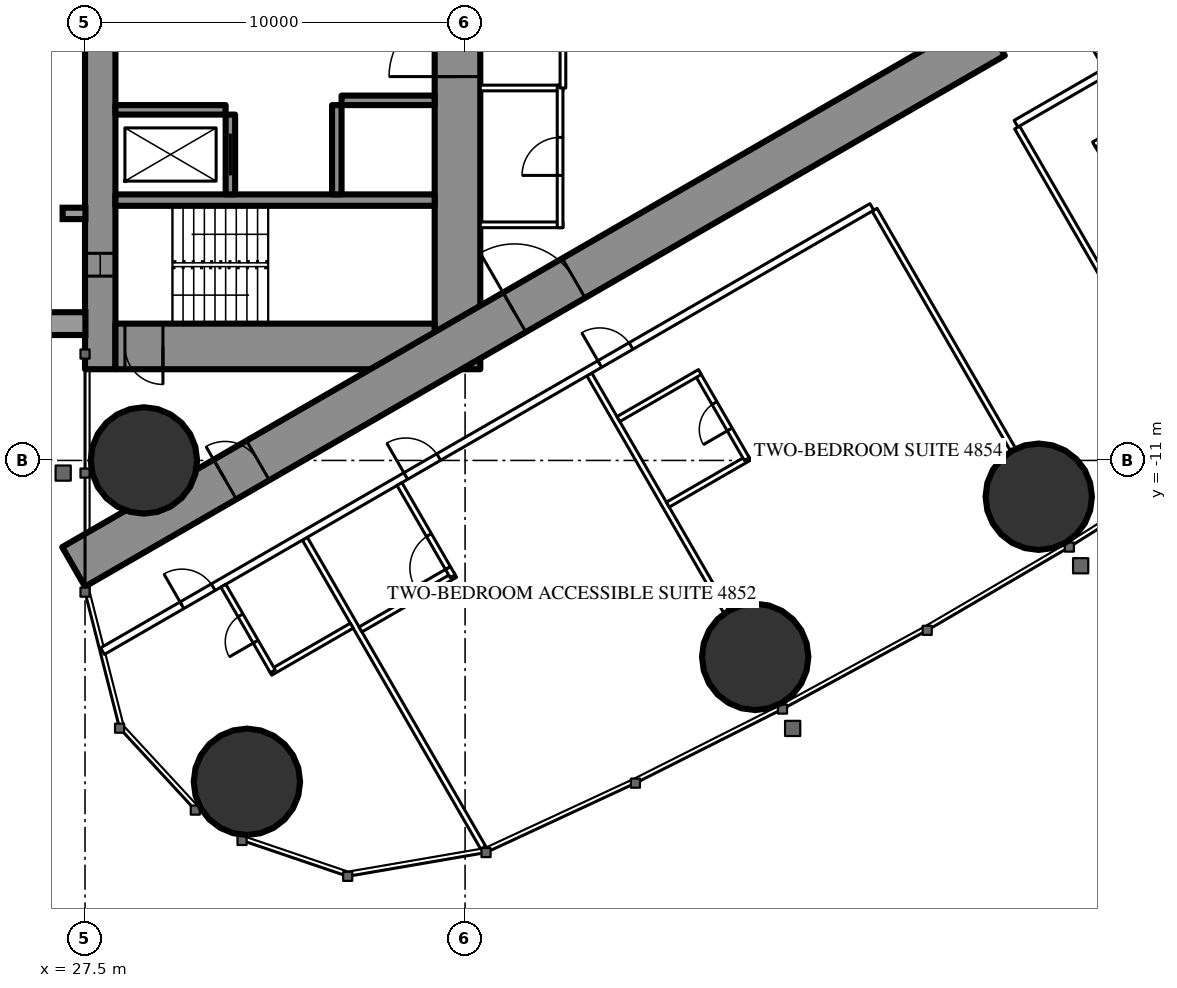
"""IFC4 building model, lengths in metres.
Left out: names, types, materials, properties, quantities, classifications, styles, units other than length and angle.
Written with IfcOpenShell. Run it as: python <this file> out.ifc"""

import sys

from ifc_helpers import new_model, si_unit, direction, frame, frame_2d, origin, origin_2d, place, context, subcontext, project, spatial, rectangle, circle, extrude, element, fill, save


model = new_model("IFC4")
c1 = context("Model", 3, precision=1e-05, world=origin(), true_north=direction((0.0, 1.0)))
c2 = subcontext(c1, "Body", "Model", "MODEL_VIEW")
j1 = project(units=[si_unit("LENGTHUNIT", "METRE"), si_unit("PLANEANGLEUNIT", "RADIAN")], contexts=[c1])
p1 = place(None, origin())
s1 = spatial("IfcSite", under=j1, at=p1, CompositionType="ELEMENT")
p2 = place(p1, origin())
s2 = spatial("IfcBuilding", under=s1, at=p2, CompositionType="ELEMENT")
p3 = place(p2, frame((0.0, 0.0, 180.8)))
s3 = spatial("IfcBuildingStorey", under=s2, at=p3, CompositionType="ELEMENT", Elevation=180.8)
for number, where, z_axis, x_axis in (
    (1, (31.76, -19.456, 0.0), (0.0, 0.0, 1.0), (1.0, 0.0, 0.0)),
    (2, (29.05, -11.0, 0.0), (0.0, 0.0, 1.0), (1.0, 0.0, 0.0)),
    (3, (45.134, -16.168, 0.0), (0.0, 0.0, 1.0), (1.0, 0.0, 0.0)),
    (4, (52.594, -11.955, 0.0), (0.0, 0.0, 1.0), (1.0, 0.0, 0.0)),
):
    element("IfcColumn", number, at=place(p3, frame(where, z_axis=z_axis, x_axis=x_axis)), inside=s3, PredefinedType="COLUMN", context=c2, shape_type="SweptSolid", body=[
        extrude(circle(Radius=1.4, at=origin_2d()), origin(), (0.0, 0.0, 1.0), 3.5),
    ])
p4 = place(p3, frame((27.9, -8.6, 0.0), z_axis=(0.0, 0.0, 1.0), x_axis=(0.0, 1.0, 0.0)))
e5 = element("IfcWall", 5, at=p4, inside=s3, PredefinedType="SHEAR", context=c2, shape_type="SweptSolid", body=[
    extrude(rectangle(XDim=17.2, YDim=0.8, at=frame_2d((8.6, 0.0))), origin(), (0.0, 0.0, 1.0), 3.5),
])
p5 = place(p4, frame((2.45, 0.0, 0.6)))
e6 = element("IfcOpeningElement", 6, at=p5, cuts=e5, PredefinedType="OPENING", context=c2, shape_type="SweptSolid", body=[
    extrude(rectangle(XDim=0.6, YDim=2.1, at=frame_2d((0.3, 1.05))), frame((0.0, 0.41, 0.0), z_axis=(0.0, -1.0, 0.0), x_axis=(1.0, 0.0, 0.0)), (0.0, 0.0, 1.0), 0.82),
])
p6 = place(p4, frame((14.15, 0.0, 0.6)))
e7 = element("IfcOpeningElement", 7, at=p6, cuts=e5, PredefinedType="OPENING", context=c2, shape_type="SweptSolid", body=[
    extrude(rectangle(XDim=0.6, YDim=2.1, at=frame_2d((0.3, 1.05))), frame((0.0, 0.41, 0.0), z_axis=(0.0, -1.0, 0.0), x_axis=(1.0, 0.0, 0.0)), (0.0, 0.0, 1.0), 0.82),
])
p7 = place(p3, frame((37.3, -8.6, 0.0), z_axis=(0.0, 0.0, 1.0), x_axis=(0.0, 1.0, 0.0)))
e8 = element("IfcWall", 8, at=p7, inside=s3, PredefinedType="SHEAR", context=c2, shape_type="SweptSolid", body=[
    extrude(rectangle(XDim=17.2, YDim=1.2, at=frame_2d((8.6, 0.0))), origin(), (0.0, 0.0, 1.0), 3.5),
])
p8 = place(p7, frame((7.7, 0.0, 0.0)))
e9 = element("IfcOpeningElement", 9, at=p8, cuts=e8, PredefinedType="OPENING", context=c2, shape_type="SweptSolid", body=[
    extrude(rectangle(XDim=1.8, YDim=2.2, at=frame_2d((0.9, 1.1))), frame((0.0, 0.61, 0.0), z_axis=(0.0, -1.0, 0.0), x_axis=(1.0, 0.0, 0.0)), (0.0, 0.0, 1.0), 1.22),
])
p9 = place(p3, frame((28.3, -8.0, 0.0), z_axis=(0.0, 0.0, 1.0), x_axis=(1.0, 0.0, 0.0)))
e10 = element("IfcWall", 10, at=p9, inside=s3, PredefinedType="SHEAR", context=c2, shape_type="SweptSolid", body=[
    extrude(rectangle(XDim=8.4, YDim=1.2, at=frame_2d((4.2, 0.0))), origin(), (0.0, 0.0, 1.0), 3.5),
])
p10 = place(p9, frame((0.25, 0.0, 0.0)))
e11 = element("IfcOpeningElement", 11, at=p10, cuts=e10, PredefinedType="OPENING", context=c2, shape_type="SweptSolid", body=[
    extrude(rectangle(XDim=1.0, YDim=2.2, at=frame_2d((0.5, 1.1))), frame((0.0, 0.61, 0.0), z_axis=(0.0, -1.0, 0.0), x_axis=(1.0, 0.0, 0.0)), (0.0, 0.0, 1.0), 1.22),
])
p11 = place(p3, frame((28.3, -4.15, 0.0), z_axis=(0.0, 0.0, 1.0), x_axis=(1.0, 0.0, 0.0)))
e12 = element("IfcWall", 12, at=p11, inside=s3, PredefinedType="SHEAR", context=c2, shape_type="SweptSolid", body=[
    extrude(rectangle(XDim=8.4, YDim=0.3, at=frame_2d((4.2, 0.0))), origin(), (0.0, 0.0, 1.0), 3.5),
])
p12 = place(p3, frame((31.325, -4.0, 0.0), z_axis=(0.0, 0.0, 1.0), x_axis=(0.0, 1.0, 0.0)))
e13 = element("IfcWall", 13, at=p12, inside=s3, PredefinedType="SHEAR", context=c2, shape_type="SweptSolid", body=[
    extrude(rectangle(XDim=2.1, YDim=0.25, at=frame_2d((1.05, 0.0))), origin(), (0.0, 0.0, 1.0), 3.5),
])
p13 = place(p12, frame((0.5, 0.0, 0.0)))
e14 = element("IfcOpeningElement", 14, at=p13, cuts=e13, PredefinedType="OPENING", context=c2, shape_type="SweptSolid", body=[
    extrude(rectangle(XDim=1.1, YDim=2.2, at=frame_2d((0.55, 1.1))), frame((0.0, 0.135, 0.0), z_axis=(0.0, -1.0, 0.0), x_axis=(1.0, 0.0, 0.0)), (0.0, 0.0, 1.0), 0.27),
])
p14 = place(p3, frame((34.125, -4.0, 0.0), z_axis=(0.0, 0.0, 1.0), x_axis=(0.0, 1.0, 0.0)))
e15 = element("IfcWall", 15, at=p14, inside=s3, PredefinedType="SHEAR", context=c2, shape_type="SweptSolid", body=[
    extrude(rectangle(XDim=2.35, YDim=0.25, at=frame_2d((1.175, 0.0))), origin(), (0.0, 0.0, 1.0), 3.5),
])
p15 = place(p3, frame((28.3, -1.775, 0.0), z_axis=(0.0, 0.0, 1.0), x_axis=(1.0, 0.0, 0.0)))
e16 = element("IfcWall", 16, at=p15, inside=s3, PredefinedType="SHEAR", context=c2, shape_type="SweptSolid", body=[
    extrude(rectangle(XDim=2.9, YDim=0.25, at=frame_2d((1.45, 0.0))), origin(), (0.0, 0.0, 1.0), 3.5),
])
p16 = place(p3, frame((34.25, -1.525, 0.0), z_axis=(0.0, 0.0, 1.0), x_axis=(1.0, 0.0, 0.0)))
e17 = element("IfcWall", 17, at=p16, inside=s3, PredefinedType="SHEAR", context=c2, shape_type="SweptSolid", body=[
    extrude(rectangle(XDim=2.45, YDim=0.25, at=frame_2d((1.225, 0.0))), origin(), (0.0, 0.0, 1.0), 3.5),
])
p17 = place(p3, frame((27.2, -13.8, 0.0), z_axis=(0.0, 0.0, 1.0), x_axis=(0.866027159892, 0.499996958321, 0.0)))
e18 = element("IfcWall", 18, at=p17, inside=s3, PredefinedType="SHEAR", context=c2, shape_type="SweptSolid", body=[
    extrude(rectangle(XDim=27.947, YDim=1.2, at=frame_2d((13.973, 0.0))), origin(), (0.0, 0.0, 1.0), 3.5),
])
p18 = place(p17, frame((4.6, 0.0, 0.0)))
e19 = element("IfcOpeningElement", 19, at=p18, cuts=e18, PredefinedType="OPENING", context=c2, shape_type="SweptSolid", body=[
    extrude(rectangle(XDim=1.0, YDim=2.2, at=frame_2d((0.5, 1.1))), frame((0.0, 0.61, 0.0), z_axis=(0.0, -1.0, 0.0), x_axis=(1.0, 0.0, 0.0)), (0.0, 0.0, 1.0), 1.22),
])
p19 = place(p17, frame((13.395, 0.0, 0.0)))
e20 = element("IfcOpeningElement", 20, at=p19, cuts=e18, PredefinedType="OPENING", context=c2, shape_type="SweptSolid", body=[
    extrude(rectangle(XDim=1.8, YDim=2.2, at=frame_2d((0.9, 1.1))), frame((0.0, 0.61, 0.0), z_axis=(0.0, -1.0, 0.0), x_axis=(1.0, 0.0, 0.0)), (0.0, 0.0, 1.0), 1.22),
])
p20 = place(p3, frame((33.284, -13.059, 0.0), z_axis=(0.0, 0.0, 1.0), x_axis=(0.499985904184, -0.866033541855, 0.0)))
e21 = element("IfcWall", 21, at=p20, inside=s3, PredefinedType="PARTITIONING", context=c2, shape_type="SweptSolid", body=[
    extrude(rectangle(XDim=9.385, YDim=0.15, at=frame_2d((4.693, 0.0))), origin(), (0.0, 0.0, 1.0), 3.25),
])
p21 = place(p3, frame((40.769, -8.737, 0.0), z_axis=(0.0, 0.0, 1.0), x_axis=(0.500013115284, -0.866017831539, 0.0)))
e22 = element("IfcWall", 22, at=p21, inside=s3, PredefinedType="PARTITIONING", context=c2, shape_type="SweptSolid", body=[
    extrude(rectangle(XDim=7.198, YDim=0.15, at=frame_2d((3.599, 0.0))), origin(), (0.0, 0.0, 1.0), 2.3),
])
p22 = place(p3, frame((48.275, -4.404, 0.0), z_axis=(0.0, 0.0, 1.0), x_axis=(0.500006004368, -0.866021937133, 0.0)))
e23 = element("IfcWall", 23, at=p22, inside=s3, PredefinedType="PARTITIONING", context=c2, shape_type="SweptSolid", body=[
    extrude(rectangle(XDim=7.279, YDim=0.15, at=frame_2d((3.64, 0.0))), origin(), (0.0, 0.0, 1.0), 2.3),
])
p23 = place(p3, frame((52.025, -2.238, 0.0), z_axis=(0.0, 0.0, 1.0), x_axis=(0.499983785035, -0.866034765296, 0.0)))
e24 = element("IfcWall", 24, at=p23, inside=s3, PredefinedType="PARTITIONING", context=c2, shape_type="SweptSolid", body=[
    extrude(rectangle(XDim=7.116, YDim=0.15, at=frame_2d((3.558, 0.0))), origin(), (0.0, 0.0, 1.0), 2.3),
])
p24 = place(p3, frame((27.959, -16.017, 0.0), z_axis=(0.0, 0.0, 1.0), x_axis=(0.866024180982, 0.50000211795, 0.0)))
e25 = element("IfcWall", 25, at=p24, inside=s3, PredefinedType="PARTITIONING", context=c2, shape_type="SweptSolid", body=[
    extrude(rectangle(XDim=23.375, YDim=0.2, at=frame_2d((11.688, 0.0))), origin(), (0.0, 0.0, 1.0), 3.25),
])
p25 = place(p24, frame((2.415, 0.0, 0.0)))
e26 = element("IfcOpeningElement", 26, at=p25, cuts=e25, PredefinedType="OPENING", context=c2, shape_type="SweptSolid", body=[
    extrude(rectangle(XDim=0.95, YDim=2.2, at=frame_2d((0.475, 1.1))), frame((0.0, 0.11, 0.0), z_axis=(0.0, -1.0, 0.0), x_axis=(1.0, 0.0, 0.0)), (0.0, 0.0, 1.0), 0.22),
])
p26 = place(p24, frame((9.215, 0.0, 0.0)))
e27 = element("IfcOpeningElement", 27, at=p26, cuts=e25, PredefinedType="OPENING", context=c2, shape_type="SweptSolid", body=[
    extrude(rectangle(XDim=1.0, YDim=2.2, at=frame_2d((0.5, 1.1))), frame((0.0, 0.11, 0.0), z_axis=(0.0, -1.0, 0.0), x_axis=(1.0, 0.0, 0.0)), (0.0, 0.0, 1.0), 0.22),
])
p27 = place(p24, frame((15.109, 0.0, 0.0)))
e28 = element("IfcOpeningElement", 28, at=p27, cuts=e25, PredefinedType="OPENING", context=c2, shape_type="SweptSolid", body=[
    extrude(rectangle(XDim=0.95, YDim=2.2, at=frame_2d((0.475, 1.1))), frame((0.0, 0.11, 0.0), z_axis=(0.0, -1.0, 0.0), x_axis=(1.0, 0.0, 0.0)), (0.0, 0.0, 1.0), 0.22),
])
p28 = place(p3, frame((51.997, -2.139, 0.0), z_axis=(0.0, 0.0, 1.0), x_axis=(0.866036399848, 0.499980953776, 0.0)))
e29 = element("IfcWall", 29, at=p28, inside=s3, PredefinedType="PARTITIONING", context=c2, shape_type="SweptSolid", body=[
    extrude(rectangle(XDim=4.279, YDim=0.2, at=frame_2d((2.139, 0.0))), origin(), (0.0, 0.0, 1.0), 3.25),
])
p29 = place(p28, frame((2.729, 0.0, 0.0)))
e30 = element("IfcOpeningElement", 30, at=p29, cuts=e29, PredefinedType="OPENING", context=c2, shape_type="SweptSolid", body=[
    extrude(rectangle(XDim=0.95, YDim=2.2, at=frame_2d((0.475, 1.1))), frame((0.0, 0.11, 0.0), z_axis=(0.0, -1.0, 0.0), x_axis=(1.0, 0.0, 0.0)), (0.0, 0.0, 1.0), 0.22),
])
p30 = place(p3, frame((32.375, -16.585, 0.0), z_axis=(0.0, 0.0, 1.0), x_axis=(0.86604923931, 0.499958713387, 0.0)))
e31 = element("IfcWall", 31, at=p30, inside=s3, PredefinedType="PARTITIONING", context=c2, shape_type="SweptSolid", body=[
    extrude(rectangle(XDim=2.475, YDim=0.15, at=frame_2d((1.237, 0.0))), origin(), (0.0, 0.0, 1.0), 3.25),
])
p31 = place(p3, frame((31.14, -14.296, 0.0), z_axis=(0.0, 0.0, 1.0), x_axis=(0.500006934395, -0.866021400173, 0.0)))
e32 = element("IfcWall", 32, at=p31, inside=s3, PredefinedType="PARTITIONING", context=c2, shape_type="SweptSolid", body=[
    extrude(rectangle(XDim=2.6, YDim=0.15, at=frame_2d((1.3, 0.0))), origin(), (0.0, 0.0, 1.0), 3.25),
])
p32 = place(p31, frame((0.9, 0.0, 0.0)))
e33 = element("IfcOpeningElement", 33, at=p32, cuts=e32, PredefinedType="OPENING", context=c2, shape_type="SweptSolid", body=[
    extrude(rectangle(XDim=0.8, YDim=2.2, at=frame_2d((0.4, 1.1))), frame((0.0, 0.085, 0.0), z_axis=(0.0, -1.0, 0.0), x_axis=(1.0, 0.0, 0.0)), (0.0, 0.0, 1.0), 0.17),
])
p33 = place(p3, frame((34.749, -15.446, 0.0), z_axis=(0.0, 0.0, 1.0), x_axis=(0.866018712932, 0.500011588718, 0.0)))
e34 = element("IfcWall", 34, at=p33, inside=s3, PredefinedType="PARTITIONING", context=c2, shape_type="SweptSolid", body=[
    extrude(rectangle(XDim=2.875, YDim=0.15, at=frame_2d((1.438, 0.0))), origin(), (0.0, 0.0, 1.0), 3.25),
])
p34 = place(p3, frame((35.773, -11.621, 0.0), z_axis=(0.0, 0.0, 1.0), x_axis=(0.49998411664, -0.866034573852, 0.0)))
e35 = element("IfcWall", 35, at=p34, inside=s3, PredefinedType="PARTITIONING", context=c2, shape_type="SweptSolid", body=[
    extrude(rectangle(XDim=2.8, YDim=0.15, at=frame_2d((1.4, 0.0))), origin(), (0.0, 0.0, 1.0), 3.25),
])
p35 = place(p34, frame((1.55, 0.0, 0.0)))
e36 = element("IfcOpeningElement", 36, at=p35, cuts=e35, PredefinedType="OPENING", context=c2, shape_type="SweptSolid", body=[
    extrude(rectangle(XDim=1.0, YDim=2.2, at=frame_2d((0.5, 1.1))), frame((0.0, 0.085, 0.0), z_axis=(0.0, -1.0, 0.0), x_axis=(1.0, 0.0, 0.0)), (0.0, 0.0, 1.0), 0.17),
])
p36 = place(p3, frame((42.834, -12.164, 0.0), z_axis=(0.0, 0.0, 1.0), x_axis=(0.866031185235, 0.4999899861, 0.0)))
e37 = element("IfcWall", 37, at=p36, inside=s3, PredefinedType="PARTITIONING", context=c2, shape_type="SweptSolid", body=[
    extrude(rectangle(XDim=2.475, YDim=0.15, at=frame_2d((1.238, 0.0))), origin(), (0.0, 0.0, 1.0), 3.25),
])
p37 = place(p3, frame((43.613, -8.712, 0.0), z_axis=(0.0, 0.0, 1.0), x_axis=(0.500006934395, -0.866021400173, 0.0)))
e38 = element("IfcWall", 38, at=p37, inside=s3, PredefinedType="PARTITIONING", context=c2, shape_type="SweptSolid", body=[
    extrude(rectangle(XDim=2.6, YDim=0.15, at=frame_2d((1.3, 0.0))), origin(), (0.0, 0.0, 1.0), 3.25),
])
p38 = place(p37, frame((0.9, 0.0, 0.0)))
e39 = element("IfcOpeningElement", 39, at=p38, cuts=e38, PredefinedType="OPENING", context=c2, shape_type="SweptSolid", body=[
    extrude(rectangle(XDim=0.8, YDim=2.2, at=frame_2d((0.4, 1.1))), frame((0.0, 0.085, 0.0), z_axis=(0.0, -1.0, 0.0), x_axis=(1.0, 0.0, 0.0)), (0.0, 0.0, 1.0), 0.17),
])
p39 = place(p3, frame((41.534, -9.912, 0.0), z_axis=(0.0, 0.0, 1.0), x_axis=(0.866031185235, 0.4999899861, 0.0)))
e40 = element("IfcWall", 40, at=p39, inside=s3, PredefinedType="PARTITIONING", context=c2, shape_type="SweptSolid", body=[
    extrude(rectangle(XDim=2.475, YDim=0.15, at=frame_2d((1.238, 0.0))), origin(), (0.0, 0.0, 1.0), 3.25),
])
p40 = place(p3, frame((54.114, -2.649, 0.0), z_axis=(0.0, 0.0, 1.0), x_axis=(0.500006934395, -0.866021400173, 0.0)))
e41 = element("IfcWall", 41, at=p40, inside=s3, PredefinedType="PARTITIONING", context=c2, shape_type="SweptSolid", body=[
    extrude(rectangle(XDim=2.6, YDim=0.15, at=frame_2d((1.3, 0.0))), origin(), (0.0, 0.0, 1.0), 3.25),
])
p41 = place(p40, frame((0.9, 0.0, 0.0)))
e42 = element("IfcOpeningElement", 42, at=p41, cuts=e41, PredefinedType="OPENING", context=c2, shape_type="SweptSolid", body=[
    extrude(rectangle(XDim=0.8, YDim=2.2, at=frame_2d((0.4, 1.1))), frame((0.0, 0.085, 0.0), z_axis=(0.0, -1.0, 0.0), x_axis=(1.0, 0.0, 0.0)), (0.0, 0.0, 1.0), 0.17),
])
p42 = place(p3, frame((54.049, -2.687, 0.0), z_axis=(0.0, 0.0, 1.0), x_axis=(0.866006523861, 0.500032699561, 0.0)))
e43 = element("IfcWall", 43, at=p42, inside=s3, PredefinedType="PARTITIONING", context=c2, shape_type="SweptSolid", body=[
    extrude(rectangle(XDim=2.475, YDim=0.15, at=frame_2d((1.237, 0.0))), origin(), (0.0, 0.0, 1.0), 3.25),
])
for number, where, z_axis, x_axis in (
    (44, (37.9, -1.2, 0.0), (0.0, 0.0, 1.0), (1.0, 0.0, 0.0)),
    (45, (37.9, -4.8, 0.0), (0.0, 0.0, 1.0), (1.0, 0.0, 0.0)),
):
    element("IfcWall", number, at=place(p3, frame(where, z_axis=z_axis, x_axis=x_axis)), inside=s3, PredefinedType="PARTITIONING", context=c2, shape_type="SweptSolid", body=[
        extrude(rectangle(XDim=2.175, YDim=0.15, at=frame_2d((1.087, 0.0))), origin(), (0.0, 0.0, 1.0), 3.25),
    ])
p43 = place(p3, frame((40.0, -4.875, 0.0), z_axis=(0.0, 0.0, 1.0), x_axis=(0.0, 1.0, 0.0)))
e46 = element("IfcWall", 46, at=p43, inside=s3, PredefinedType="PARTITIONING", context=c2, shape_type="SweptSolid", body=[
    extrude(rectangle(XDim=3.75, YDim=0.15, at=frame_2d((1.875, 0.0))), origin(), (0.0, 0.0, 1.0), 3.25),
])
p44 = place(p43, frame((1.375, 0.0, 0.0)))
e47 = element("IfcOpeningElement", 47, at=p44, cuts=e46, PredefinedType="OPENING", context=c2, shape_type="SweptSolid", body=[
    extrude(rectangle(XDim=1.0, YDim=2.2, at=frame_2d((0.5, 1.1))), frame((0.0, 0.085, 0.0), z_axis=(0.0, -1.0, 0.0), x_axis=(1.0, 0.0, 0.0)), (0.0, 0.0, 1.0), 0.17),
])
p45 = place(p3, frame((40.075, -1.2, 0.0), z_axis=(0.0, 0.0, 1.0), x_axis=(0.0, 1.0, 0.0)))
e48 = element("IfcWall", 48, at=p45, inside=s3, PredefinedType="PARTITIONING", context=c2, shape_type="SweptSolid", body=[
    extrude(rectangle(XDim=6.874, YDim=0.15, at=frame_2d((3.437, 0.0))), origin(), (0.0, 0.0, 1.0), 3.25),
])
p46 = place(p45, frame((2.537, 0.0, 0.0)))
e49 = element("IfcOpeningElement", 49, at=p46, cuts=e48, PredefinedType="OPENING", context=c2, shape_type="SweptSolid", body=[
    extrude(rectangle(XDim=1.8, YDim=2.2, at=frame_2d((0.9, 1.1))), frame((0.0, 0.085, 0.0), z_axis=(0.0, -1.0, 0.0), x_axis=(1.0, 0.0, 0.0)), (0.0, 0.0, 1.0), 0.17),
])
p47 = place(p32, origin())
e50 = element("IfcDoor", 50, at=p47, inside=s3, OperationType="SINGLE_SWING_RIGHT", PredefinedType="DOOR", context=c2, shape_type="SweptSolid", body=[
    extrude(rectangle(XDim=0.8, YDim=2.2, at=frame_2d((0.4, 1.1))), frame((0.0, 0.025, 0.0), z_axis=(0.0, -1.0, 0.0), x_axis=(1.0, 0.0, 0.0)), (0.0, 0.0, 1.0), 0.05),
])
fill(e33, e50)
p48 = place(p25, origin())
e51 = element("IfcDoor", 51, at=p48, inside=s3, OperationType="SINGLE_SWING_LEFT", PredefinedType="DOOR", context=c2, shape_type="SweptSolid", body=[
    extrude(rectangle(XDim=0.95, YDim=2.2, at=frame_2d((0.475, 1.1))), frame((0.0, 0.025, 0.0), z_axis=(0.0, -1.0, 0.0), x_axis=(1.0, 0.0, 0.0)), (0.0, 0.0, 1.0), 0.05),
])
fill(e26, e51)
p49 = place(p35, origin())
e52 = element("IfcDoor", 52, at=p49, inside=s3, OperationType="SINGLE_SWING_RIGHT", PredefinedType="DOOR", context=c2, shape_type="SweptSolid", body=[
    extrude(rectangle(XDim=1.0, YDim=2.2, at=frame_2d((0.5, 1.1))), frame((0.0, 0.025, 0.0), z_axis=(0.0, -1.0, 0.0), x_axis=(1.0, 0.0, 0.0)), (0.0, 0.0, 1.0), 0.05),
])
fill(e36, e52)
p50 = place(p26, origin())
e53 = element("IfcDoor", 53, at=p50, inside=s3, OperationType="SINGLE_SWING_LEFT", PredefinedType="DOOR", context=c2, shape_type="SweptSolid", body=[
    extrude(rectangle(XDim=1.0, YDim=2.2, at=frame_2d((0.5, 1.1))), frame((0.0, 0.025, 0.0), z_axis=(0.0, -1.0, 0.0), x_axis=(1.0, 0.0, 0.0)), (0.0, 0.0, 1.0), 0.05),
])
fill(e27, e53)
p51 = place(p38, origin())
e54 = element("IfcDoor", 54, at=p51, inside=s3, OperationType="SINGLE_SWING_RIGHT", PredefinedType="DOOR", context=c2, shape_type="SweptSolid", body=[
    extrude(rectangle(XDim=0.8, YDim=2.2, at=frame_2d((0.4, 1.1))), frame((0.0, 0.025, 0.0), z_axis=(0.0, -1.0, 0.0), x_axis=(1.0, 0.0, 0.0)), (0.0, 0.0, 1.0), 0.05),
])
fill(e39, e54)
p52 = place(p27, origin())
e55 = element("IfcDoor", 55, at=p52, inside=s3, OperationType="SINGLE_SWING_LEFT", PredefinedType="DOOR", context=c2, shape_type="SweptSolid", body=[
    extrude(rectangle(XDim=0.95, YDim=2.2, at=frame_2d((0.475, 1.1))), frame((0.0, 0.025, 0.0), z_axis=(0.0, -1.0, 0.0), x_axis=(1.0, 0.0, 0.0)), (0.0, 0.0, 1.0), 0.05),
])
fill(e28, e55)
p53 = place(p44, origin())
e56 = element("IfcDoor", 56, at=p53, inside=s3, OperationType="SINGLE_SWING_LEFT", PredefinedType="DOOR", context=c2, shape_type="SweptSolid", body=[
    extrude(rectangle(XDim=1.0, YDim=2.2, at=frame_2d((0.5, 1.1))), frame((0.0, 0.025, 0.0), z_axis=(0.0, -1.0, 0.0), x_axis=(1.0, 0.0, 0.0)), (0.0, 0.0, 1.0), 0.05),
])
fill(e47, e56)
p54 = place(p18, origin())
e57 = element("IfcDoor", 57, at=p54, inside=s3, OperationType="SINGLE_SWING_LEFT", PredefinedType="DOOR", context=c2, shape_type="SweptSolid", body=[
    extrude(rectangle(XDim=1.0, YDim=2.2, at=frame_2d((0.5, 1.1))), frame((0.0, 0.025, 0.0), z_axis=(0.0, -1.0, 0.0), x_axis=(1.0, 0.0, 0.0)), (0.0, 0.0, 1.0), 0.05),
])
fill(e19, e57)
p55 = place(p19, origin())
e58 = element("IfcDoor", 58, at=p55, inside=s3, OperationType="DOUBLE_DOOR_SINGLE_SWING", PredefinedType="DOOR", context=c2, shape_type="SweptSolid", body=[
    extrude(rectangle(XDim=1.8, YDim=2.2, at=frame_2d((0.9, 1.1))), frame((0.0, 0.025, 0.0), z_axis=(0.0, -1.0, 0.0), x_axis=(1.0, 0.0, 0.0)), (0.0, 0.0, 1.0), 0.05),
])
fill(e20, e58)
p56 = place(p8, origin())
e59 = element("IfcDoor", 59, at=p56, inside=s3, OperationType="DOUBLE_DOOR_SINGLE_SWING", PredefinedType="DOOR", context=c2, shape_type="SweptSolid", body=[
    extrude(rectangle(XDim=1.8, YDim=2.2, at=frame_2d((0.9, 1.1))), frame((0.0, 0.025, 0.0), z_axis=(0.0, -1.0, 0.0), x_axis=(1.0, 0.0, 0.0)), (0.0, 0.0, 1.0), 0.05),
])
fill(e9, e59)
p57 = place(p10, origin())
e60 = element("IfcDoor", 60, at=p57, inside=s3, OperationType="SINGLE_SWING_RIGHT", PredefinedType="DOOR", context=c2, shape_type="SweptSolid", body=[
    extrude(rectangle(XDim=1.0, YDim=2.2, at=frame_2d((0.5, 1.1))), frame((0.0, 0.025, 0.0), z_axis=(0.0, -1.0, 0.0), x_axis=(1.0, 0.0, 0.0)), (0.0, 0.0, 1.0), 0.05),
])
fill(e11, e60)
p58 = place(p13, origin())
e61 = element("IfcDoor", 61, at=p58, inside=s3, OperationType="SLIDING_TO_LEFT", PredefinedType="USERDEFINED", context=c2, shape_type="SweptSolid", body=[
    extrude(rectangle(XDim=1.1, YDim=2.2, at=frame_2d((0.55, 1.1))), frame((0.0, 0.025, 0.0), z_axis=(0.0, -1.0, 0.0), x_axis=(1.0, 0.0, 0.0)), (0.0, 0.0, 1.0), 0.05),
])
fill(e14, e61)
p59 = place(p5, origin())
e62 = element("IfcWindow", 62, at=p59, inside=s3, PartitioningType="SINGLE_PANEL", PredefinedType="WINDOW", context=c2, shape_type="SweptSolid", body=[
    extrude(rectangle(XDim=0.6, YDim=2.1, at=frame_2d((0.3, 1.05))), frame((0.0, 0.03, 0.0), z_axis=(0.0, -1.0, 0.0), x_axis=(1.0, 0.0, 0.0)), (0.0, 0.0, 1.0), 0.06),
])
fill(e6, e62)
save(model, sys.argv[1])
